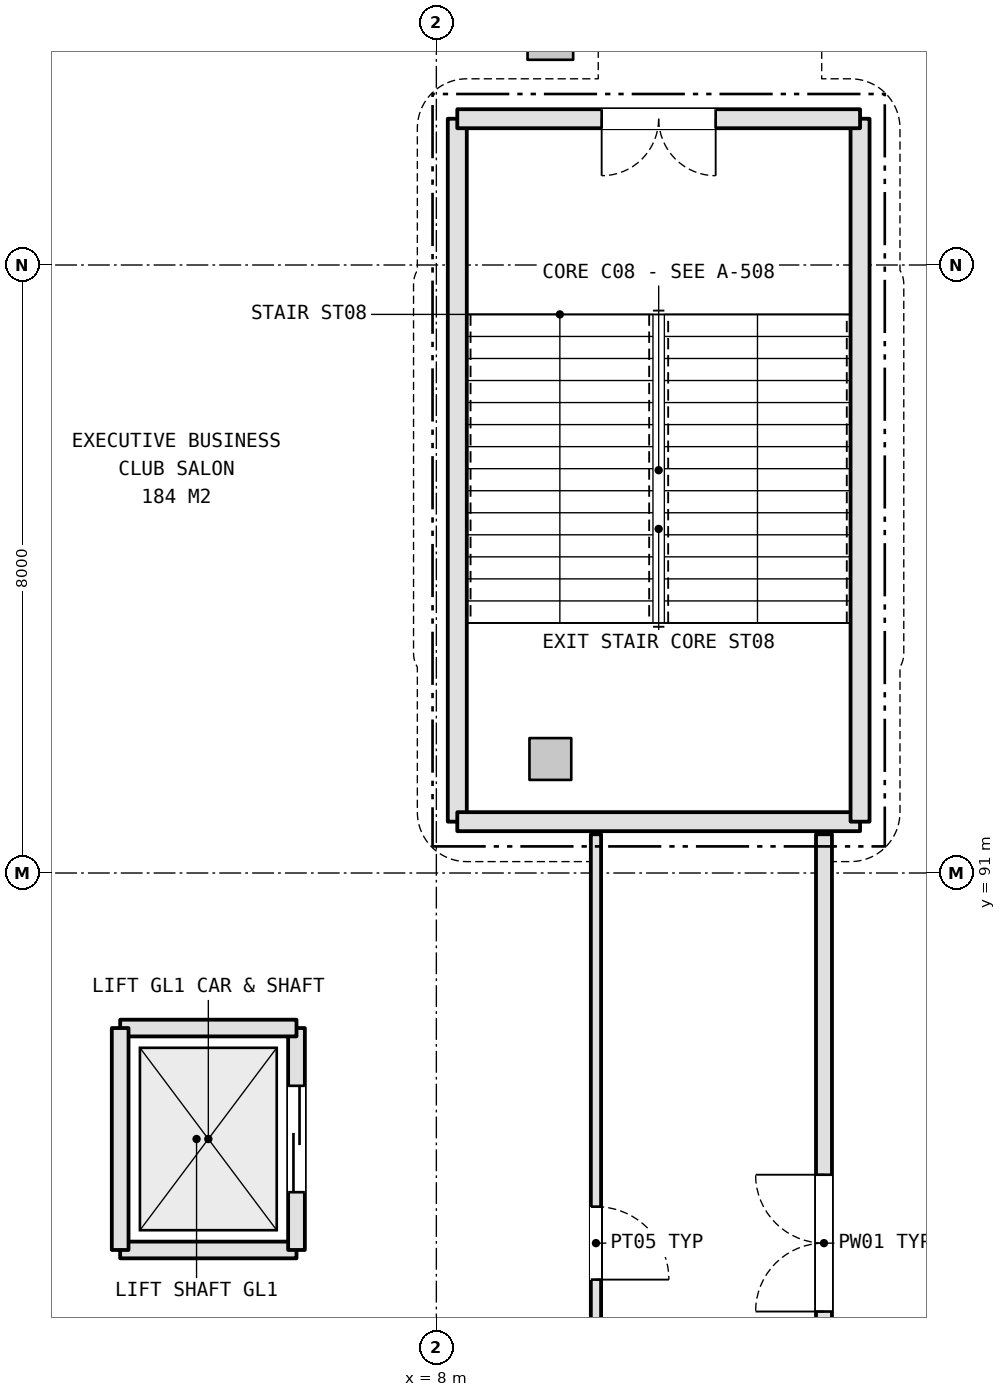
"""IFC4 building model, lengths in metres.
Left out: names, types, materials, properties, quantities, classifications, styles, units other than length and angle.
Written with IfcOpenShell. Run it as: python <this file> out.ifc"""

import sys

from ifc_helpers import new_model, si_unit, direction, frame, frame_2d, origin, origin_2d, place, context, subcontext, project, spatial, rectangle, extrude, element, fill, save


model = new_model("IFC4")
c1 = context("Model", 3, precision=1e-05, world=origin(), true_north=direction((0.0, 1.0)))
c2 = subcontext(c1, "Body", "Model", "MODEL_VIEW")
j1 = project(units=[si_unit("LENGTHUNIT", "METRE"), si_unit("PLANEANGLEUNIT", "RADIAN")], contexts=[c1])
p1 = place(None, origin())
s1 = spatial("IfcSite", under=j1, at=p1, CompositionType="ELEMENT")
p2 = place(p1, origin())
s2 = spatial("IfcBuilding", under=s1, at=p2, CompositionType="ELEMENT")
p3 = place(p2, frame((0.0, 0.0, 16.2)))
s3 = spatial("IfcBuildingStorey", under=s2, at=p3, CompositionType="ELEMENT", Elevation=16.2)
p4 = place(p3, frame((9.5, 92.5, 0.0), z_axis=(0.0, 0.0, 1.0), x_axis=(1.0, 0.0, 0.0)))
e1 = element("IfcColumn", 1, at=p4, inside=s3, PredefinedType="COLUMN", context=c2, shape_type="SweptSolid", body=[
    extrude(rectangle(XDim=0.55, YDim=0.55, at=origin_2d()), origin(), (0.0, 0.0, 1.0), 5.4),
])
p5 = place(p3, frame((9.5, 102.0, 0.0), z_axis=(0.0, 0.0, 1.0), x_axis=(1.0, 0.0, 0.0)))
e2 = element("IfcColumn", 2, at=p5, inside=s3, PredefinedType="COLUMN", context=c2, shape_type="SweptSolid", body=[
    extrude(rectangle(XDim=0.6, YDim=0.6, at=origin_2d()), origin(), (0.0, 0.0, 1.0), 5.4),
])
p6 = place(p3, frame((8.275, 100.925, 0.0), z_axis=(0.0, 0.0, 1.0), x_axis=(0.0, -1.0, 0.0)))
e3 = element("IfcWall", 3, at=p6, inside=s3, PredefinedType="SHEAR", context=c2, shape_type="SweptSolid", body=[
    extrude(rectangle(XDim=9.249, YDim=0.25, at=frame_2d((4.625, 0.0))), origin(), (0.0, 0.0, 1.0), 5.14),
])
p7 = place(p3, frame((8.275, 91.675, 0.0), z_axis=(0.0, 0.0, 1.0), x_axis=(1.0, 0.0, 0.0)))
e4 = element("IfcWall", 4, at=p7, inside=s3, PredefinedType="SHEAR", context=c2, shape_type="SweptSolid", body=[
    extrude(rectangle(XDim=5.299, YDim=0.25, at=frame_2d((2.65, 0.0))), origin(), (0.0, 0.0, 1.0), 5.14),
])
p8 = place(p3, frame((13.575, 91.675, 0.0), z_axis=(0.0, 0.0, 1.0), x_axis=(0.0, 1.0, 0.0)))
e5 = element("IfcWall", 5, at=p8, inside=s3, PredefinedType="SHEAR", context=c2, shape_type="SweptSolid", body=[
    extrude(rectangle(XDim=9.249, YDim=0.25, at=frame_2d((4.625, 0.0))), origin(), (0.0, 0.0, 1.0), 5.14),
])
p9 = place(p3, frame((13.575, 100.925, 0.0), z_axis=(0.0, 0.0, 1.0), x_axis=(-1.0, 0.0, 0.0)))
e6 = element("IfcWall", 6, at=p9, inside=s3, PredefinedType="SHEAR", context=c2, shape_type="SweptSolid", body=[
    extrude(rectangle(XDim=5.299, YDim=0.25, at=frame_2d((2.65, 0.0))), origin(), (0.0, 0.0, 1.0), 5.14),
])
p10 = place(p9, frame((1.9, 0.0, 0.0)))
e7 = element("IfcOpeningElement", 7, at=p10, cuts=e6, PredefinedType="OPENING", context=c2, shape_type="SweptSolid", body=[
    extrude(rectangle(XDim=1.5, YDim=2.2, at=frame_2d((0.75, 1.1))), frame((0.0, 0.135, 0.0), z_axis=(0.0, -1.0, 0.0), x_axis=(1.0, 0.0, 0.0)), (0.0, 0.0, 1.0), 0.27),
])
p11 = place(p3, frame((3.84, 86.04, 0.0), z_axis=(0.0, 0.0, 1.0), x_axis=(1.0, 0.0, 0.0)))
e8 = element("IfcWall", 8, at=p11, inside=s3, PredefinedType="SHEAR", context=c2, shape_type="SweptSolid", body=[
    extrude(rectangle(XDim=2.32, YDim=0.22, at=frame_2d((1.16, 0.0))), origin(), (0.0, 0.0, 1.0), 5.14),
])
p12 = place(p3, frame((6.16, 86.04, 0.0), z_axis=(0.0, 0.0, 1.0), x_axis=(0.0, 1.0, 0.0)))
e9 = element("IfcWall", 9, at=p12, inside=s3, PredefinedType="SHEAR", context=c2, shape_type="SweptSolid", body=[
    extrude(rectangle(XDim=2.92, YDim=0.22, at=frame_2d((1.46, 0.0))), origin(), (0.0, 0.0, 1.0), 5.14),
])
p13 = place(p12, frame((0.76, 0.0, 0.0)))
e10 = element("IfcOpeningElement", 10, at=p13, cuts=e9, PredefinedType="OPENING", context=c2, shape_type="SweptSolid", body=[
    extrude(rectangle(XDim=1.4, YDim=2.3, at=frame_2d((0.7, 1.15))), frame((0.0, 0.12, 0.0), z_axis=(0.0, -1.0, 0.0), x_axis=(1.0, 0.0, 0.0)), (0.0, 0.0, 1.0), 0.24),
])
p14 = place(p3, frame((6.16, 88.96, 0.0), z_axis=(0.0, 0.0, 1.0), x_axis=(-1.0, 0.0, 0.0)))
e11 = element("IfcWall", 11, at=p14, inside=s3, PredefinedType="SHEAR", context=c2, shape_type="SweptSolid", body=[
    extrude(rectangle(XDim=2.32, YDim=0.22, at=frame_2d((1.16, 0.0))), origin(), (0.0, 0.0, 1.0), 5.14),
])
p15 = place(p3, frame((3.84, 88.96, 0.0), z_axis=(0.0, 0.0, 1.0), x_axis=(0.0, -1.0, 0.0)))
e12 = element("IfcWall", 12, at=p15, inside=s3, PredefinedType="SHEAR", context=c2, shape_type="SweptSolid", body=[
    extrude(rectangle(XDim=2.92, YDim=0.22, at=frame_2d((1.46, 0.0))), origin(), (0.0, 0.0, 1.0), 5.14),
])
p16 = place(p3, frame((10.1, 91.51, 0.0), z_axis=(0.0, 0.0, 1.0), x_axis=(0.0, -1.0, 0.0)))
e13 = element("IfcWall", 13, at=p16, inside=s3, PredefinedType="PARTITIONING", context=c2, shape_type="SweptSolid", body=[
    extrude(rectangle(XDim=10.76, YDim=0.135, at=frame_2d((5.38, 0.0))), origin(), (0.0, 0.0, 1.0), 4.668),
])
p17 = place(p16, frame((4.9, 0.0, 0.0)))
e14 = element("IfcOpeningElement", 14, at=p17, cuts=e13, PredefinedType="OPENING", context=c2, shape_type="SweptSolid", body=[
    extrude(rectangle(XDim=0.96, YDim=2.15, at=frame_2d((0.48, 1.075))), frame((0.0, 0.077, 0.0), z_axis=(0.0, -1.0, 0.0), x_axis=(1.0, 0.0, 0.0)), (0.0, 0.0, 1.0), 0.155),
])
p18 = place(p3, frame((13.1, 80.75, 0.0), z_axis=(0.0, 0.0, 1.0), x_axis=(0.0, 1.0, 0.0)))
e15 = element("IfcWall", 15, at=p18, inside=s3, PredefinedType="PLUMBINGWALL", context=c2, shape_type="SweptSolid", body=[
    extrude(rectangle(XDim=10.76, YDim=0.21, at=frame_2d((5.38, 0.0))), origin(), (0.0, 0.0, 1.0), 4.668),
])
p19 = place(p18, frame((4.48, 0.0, 0.0)))
e16 = element("IfcOpeningElement", 16, at=p19, cuts=e15, PredefinedType="OPENING", context=c2, shape_type="SweptSolid", body=[
    extrude(rectangle(XDim=1.8, YDim=2.2, at=frame_2d((0.9, 1.1))), frame((0.0, 0.115, 0.0), z_axis=(0.0, -1.0, 0.0), x_axis=(1.0, 0.0, 0.0)), (0.0, 0.0, 1.0), 0.23),
])
p20 = place(p10, origin())
e17 = element("IfcDoor", 17, at=p20, inside=s3, OperationType="DOUBLE_DOOR_SINGLE_SWING", PredefinedType="DOOR", context=c2, shape_type="SweptSolid", body=[
    extrude(rectangle(XDim=1.5, YDim=2.2, at=frame_2d((0.75, 1.1))), frame((0.0, 0.025, 0.0), z_axis=(0.0, -1.0, 0.0), x_axis=(1.0, 0.0, 0.0)), (0.0, 0.0, 1.0), 0.05),
])
fill(e7, e17)
p21 = place(p13, origin())
e18 = element("IfcDoor", 18, at=p21, inside=s3, OperationType="DOUBLE_DOOR_SLIDING", PredefinedType="DOOR", context=c2, shape_type="SweptSolid", body=[
    extrude(rectangle(XDim=1.4, YDim=2.3, at=frame_2d((0.7, 1.15))), frame((0.0, 0.025, 0.0), z_axis=(0.0, -1.0, 0.0), x_axis=(1.0, 0.0, 0.0)), (0.0, 0.0, 1.0), 0.05),
])
fill(e10, e18)
p22 = place(p17, origin())
e19 = element("IfcDoor", 19, at=p22, inside=s3, OperationType="SINGLE_SWING_RIGHT", PredefinedType="DOOR", context=c2, shape_type="SweptSolid", body=[
    extrude(rectangle(XDim=0.96, YDim=2.15, at=frame_2d((0.48, 1.075))), frame((0.0, 0.025, 0.0), z_axis=(0.0, -1.0, 0.0), x_axis=(1.0, 0.0, 0.0)), (0.0, 0.0, 1.0), 0.05),
])
fill(e14, e19)
p23 = place(p19, origin())
e20 = element("IfcDoor", 20, at=p23, inside=s3, OperationType="DOUBLE_DOOR_SINGLE_SWING", PredefinedType="DOOR", context=c2, shape_type="SweptSolid", body=[
    extrude(rectangle(XDim=1.8, YDim=2.2, at=frame_2d((0.9, 1.1))), frame((0.0, 0.025, 0.0), z_axis=(0.0, -1.0, 0.0), x_axis=(1.0, 0.0, 0.0)), (0.0, 0.0, 1.0), 0.05),
])
fill(e16, e20)
save(model, sys.argv[1])
